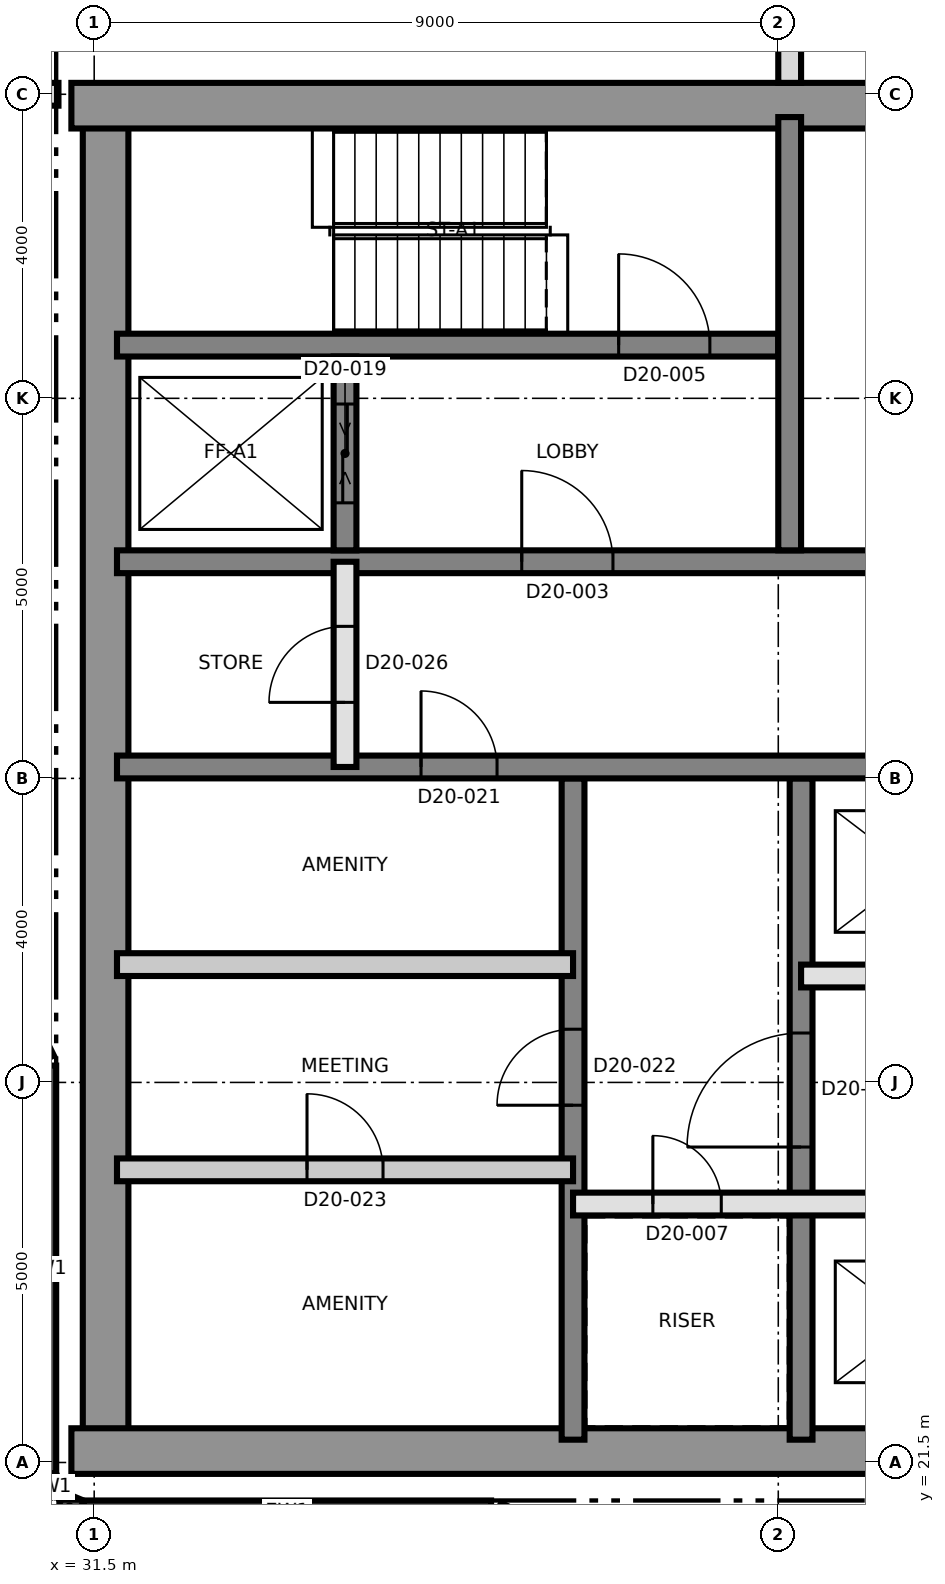
"""IFC4 building model, lengths in metres.
Left out: names, types, materials, properties, quantities, classifications, styles, units other than length and angle.
Written with IfcOpenShell. Run it as: python <this file> out.ifc"""

import sys

from ifc_helpers import new_model, si_unit, direction, frame, frame_2d, origin, place, context, subcontext, project, spatial, rectangle, extrude, element, fill, save


model = new_model("IFC4")
c1 = context("Model", 3, precision=1e-05, world=origin(), true_north=direction((0.0, 1.0)))
c2 = subcontext(c1, "Body", "Model", "MODEL_VIEW")
j1 = project(units=[si_unit("LENGTHUNIT", "METRE"), si_unit("PLANEANGLEUNIT", "RADIAN")], contexts=[c1])
p1 = place(None, origin())
s1 = spatial("IfcSite", under=j1, at=p1, CompositionType="ELEMENT")
p2 = place(p1, origin())
s2 = spatial("IfcBuilding", under=s1, at=p2, CompositionType="ELEMENT")
p3 = place(p2, frame((0.0, 0.0, 182.9)))
s3 = spatial("IfcBuildingStorey", under=s2, at=p3, CompositionType="ELEMENT", Elevation=182.9)
p4 = place(p3, frame((31.65, 21.8, 0.0), z_axis=(0.0, 0.0, 1.0), x_axis=(0.0, 1.0, 0.0)))
e1 = element("IfcWall", 1, at=p4, inside=s3, PredefinedType="SHEAR", context=c2, shape_type="SweptSolid", body=[
    extrude(rectangle(XDim=17.4, YDim=0.6, at=frame_2d((8.7, 0.0))), origin(), (0.0, 0.0, 1.0), 3.7),
])
p5 = place(p3, frame((31.2, 21.65, 0.0), z_axis=(0.0, 0.0, 1.0), x_axis=(1.0, 0.0, 0.0)))
e2 = element("IfcWall", 2, at=p5, inside=s3, PredefinedType="SHEAR", context=c2, shape_type="SweptSolid", body=[
    extrude(rectangle(XDim=27.0, YDim=0.6, at=frame_2d((13.5, 0.0))), origin(), (0.0, 0.0, 1.0), 3.7),
])
p6 = place(p3, frame((31.2, 39.35, 0.0), z_axis=(0.0, 0.0, 1.0), x_axis=(1.0, 0.0, 0.0)))
e3 = element("IfcWall", 3, at=p6, inside=s3, PredefinedType="SHEAR", context=c2, shape_type="SweptSolid", body=[
    extrude(rectangle(XDim=27.0, YDim=0.6, at=frame_2d((13.5, 0.0))), origin(), (0.0, 0.0, 1.0), 3.7),
])
p7 = place(p6, frame((10.5, 0.0, 0.0)))
e4 = element("IfcOpeningElement", 4, at=p7, cuts=e3, PredefinedType="OPENING", context=c2, shape_type="SweptSolid", body=[
    extrude(rectangle(XDim=1.2, YDim=2.1, at=frame_2d((0.6, 1.05))), frame((0.0, 0.31, 0.0), z_axis=(0.0, -1.0, 0.0), x_axis=(1.0, 0.0, 0.0)), (0.0, 0.0, 1.0), 0.62),
])
p8 = place(p3, frame((37.8, 21.8, 0.0), z_axis=(0.0, 0.0, 1.0), x_axis=(0.0, 1.0, 0.0)))
e5 = element("IfcWall", 5, at=p8, inside=s3, PredefinedType="SHEAR", context=c2, shape_type="SweptSolid", body=[
    extrude(rectangle(XDim=8.7, YDim=0.3, at=frame_2d((4.35, 0.0))), origin(), (0.0, 0.0, 1.0), 3.7),
])
p9 = place(p8, frame((4.4, 0.0, 0.0)))
e6 = element("IfcOpeningElement", 6, at=p9, cuts=e5, PredefinedType="OPENING", context=c2, shape_type="SweptSolid", body=[
    extrude(rectangle(XDim=1.0, YDim=2.1, at=frame_2d((0.5, 1.05))), frame((0.0, 0.16, 0.0), z_axis=(0.0, -1.0, 0.0), x_axis=(1.0, 0.0, 0.0)), (0.0, 0.0, 1.0), 0.32),
])
p10 = place(p3, frame((40.8, 21.8, 0.0), z_axis=(0.0, 0.0, 1.0), x_axis=(0.0, 1.0, 0.0)))
e7 = element("IfcWall", 7, at=p10, inside=s3, PredefinedType="SHEAR", context=c2, shape_type="SweptSolid", body=[
    extrude(rectangle(XDim=8.7, YDim=0.3, at=frame_2d((4.35, 0.0))), origin(), (0.0, 0.0, 1.0), 3.7),
])
p11 = place(p10, frame((3.85, 0.0, 0.0)))
e8 = element("IfcOpeningElement", 8, at=p11, cuts=e7, PredefinedType="OPENING", context=c2, shape_type="SweptSolid", body=[
    extrude(rectangle(XDim=1.5, YDim=2.1, at=frame_2d((0.75, 1.05))), frame((0.0, 0.16, 0.0), z_axis=(0.0, -1.0, 0.0), x_axis=(1.0, 0.0, 0.0)), (0.0, 0.0, 1.0), 0.32),
])
p12 = place(p3, frame((31.8, 30.65, 0.0), z_axis=(0.0, 0.0, 1.0), x_axis=(1.0, 0.0, 0.0)))
e9 = element("IfcWall", 9, at=p12, inside=s3, PredefinedType="SHEAR", context=c2, shape_type="SweptSolid", body=[
    extrude(rectangle(XDim=26.4, YDim=0.3, at=frame_2d((13.2, 0.0))), origin(), (0.0, 0.0, 1.0), 3.7),
])
p13 = place(p12, frame((24.7, 0.0, 0.0)))
e10 = element("IfcOpeningElement", 10, at=p13, cuts=e9, PredefinedType="OPENING", context=c2, shape_type="SweptSolid", body=[
    extrude(rectangle(XDim=1.0, YDim=2.1, at=frame_2d((0.5, 1.05))), frame((0.0, 0.16, 0.0), z_axis=(0.0, -1.0, 0.0), x_axis=(1.0, 0.0, 0.0)), (0.0, 0.0, 1.0), 0.32),
])
p14 = place(p12, frame((4.0, 0.0, 0.0)))
e11 = element("IfcOpeningElement", 11, at=p14, cuts=e9, PredefinedType="OPENING", context=c2, shape_type="SweptSolid", body=[
    extrude(rectangle(XDim=1.0, YDim=2.1, at=frame_2d((0.5, 1.05))), frame((0.0, 0.16, 0.0), z_axis=(0.0, -1.0, 0.0), x_axis=(1.0, 0.0, 0.0)), (0.0, 0.0, 1.0), 0.32),
])
p15 = place(p3, frame((31.8, 33.35, 0.0), z_axis=(0.0, 0.0, 1.0), x_axis=(1.0, 0.0, 0.0)))
e12 = element("IfcWall", 12, at=p15, inside=s3, PredefinedType="SHEAR", context=c2, shape_type="SweptSolid", body=[
    extrude(rectangle(XDim=26.4, YDim=0.3, at=frame_2d((13.2, 0.0))), origin(), (0.0, 0.0, 1.0), 3.7),
])
p16 = place(p15, frame((13.85, 0.0, 0.0)))
e13 = element("IfcOpeningElement", 13, at=p16, cuts=e12, PredefinedType="OPENING", context=c2, shape_type="SweptSolid", body=[
    extrude(rectangle(XDim=1.4, YDim=2.1, at=frame_2d((0.7, 1.05))), frame((0.0, 0.16, 0.0), z_axis=(0.0, -1.0, 0.0), x_axis=(1.0, 0.0, 0.0)), (0.0, 0.0, 1.0), 0.32),
])
p17 = place(p15, frame((5.325, 0.0, 0.0)))
e14 = element("IfcOpeningElement", 14, at=p17, cuts=e12, PredefinedType="OPENING", context=c2, shape_type="SweptSolid", body=[
    extrude(rectangle(XDim=1.2, YDim=2.1, at=frame_2d((0.6, 1.05))), frame((0.0, 0.16, 0.0), z_axis=(0.0, -1.0, 0.0), x_axis=(1.0, 0.0, 0.0)), (0.0, 0.0, 1.0), 0.32),
])
p18 = place(p15, frame((19.875, 0.0, 0.0)))
e15 = element("IfcOpeningElement", 15, at=p18, cuts=e12, PredefinedType="OPENING", context=c2, shape_type="SweptSolid", body=[
    extrude(rectangle(XDim=1.2, YDim=2.1, at=frame_2d((0.6, 1.05))), frame((0.0, 0.16, 0.0), z_axis=(0.0, -1.0, 0.0), x_axis=(1.0, 0.0, 0.0)), (0.0, 0.0, 1.0), 0.32),
])
p19 = place(p3, frame((31.8, 36.2, 0.0), z_axis=(0.0, 0.0, 1.0), x_axis=(1.0, 0.0, 0.0)))
e16 = element("IfcWall", 16, at=p19, inside=s3, PredefinedType="SHEAR", context=c2, shape_type="SweptSolid", body=[
    extrude(rectangle(XDim=8.7, YDim=0.3, at=frame_2d((4.35, 0.0))), origin(), (0.0, 0.0, 1.0), 3.7),
])
p20 = place(p19, frame((6.6, 0.0, 0.0)))
e17 = element("IfcOpeningElement", 17, at=p20, cuts=e16, PredefinedType="OPENING", context=c2, shape_type="SweptSolid", body=[
    extrude(rectangle(XDim=1.2, YDim=2.1, at=frame_2d((0.6, 1.05))), frame((0.0, 0.16, 0.0), z_axis=(0.0, -1.0, 0.0), x_axis=(1.0, 0.0, 0.0)), (0.0, 0.0, 1.0), 0.32),
])
p21 = place(p3, frame((40.65, 33.5, 0.0), z_axis=(0.0, 0.0, 1.0), x_axis=(0.0, 1.0, 0.0)))
e18 = element("IfcWall", 18, at=p21, inside=s3, PredefinedType="SHEAR", context=c2, shape_type="SweptSolid", body=[
    extrude(rectangle(XDim=5.7, YDim=0.3, at=frame_2d((2.85, 0.0))), origin(), (0.0, 0.0, 1.0), 3.7),
])
p22 = place(p3, frame((34.8, 33.5, 0.0), z_axis=(0.0, 0.0, 1.0), x_axis=(0.0, 1.0, 0.0)))
e19 = element("IfcWall", 19, at=p22, inside=s3, PredefinedType="SHEAR", context=c2, shape_type="SweptSolid", body=[
    extrude(rectangle(XDim=2.55, YDim=0.3, at=frame_2d((1.275, 0.0))), origin(), (0.0, 0.0, 1.0), 3.7),
])
p23 = place(p22, frame((0.625, 0.0, 0.0)))
e20 = element("IfcOpeningElement", 20, at=p23, cuts=e19, PredefinedType="OPENING", context=c2, shape_type="SweptSolid", body=[
    extrude(rectangle(XDim=1.3, YDim=2.4, at=frame_2d((0.65, 1.2))), frame((0.0, 0.16, 0.0), z_axis=(0.0, -1.0, 0.0), x_axis=(1.0, 0.0, 0.0)), (0.0, 0.0, 1.0), 0.32),
])
p24 = place(p3, frame((30.85, 26.722, 0.0), z_axis=(0.0, 0.0, 1.0), x_axis=(0.0, -1.0, 0.0)))
e21 = element("IfcWall", 21, at=p24, inside=s3, PredefinedType="SOLIDWALL", context=c2, shape_type="SweptSolid", body=[
    extrude(rectangle(XDim=5.362, YDim=0.3, at=frame_2d((2.681, 0.0))), origin(), (0.0, 0.0, 1.0), 3.4),
])
for number, where, z_axis, x_axis in (
    (22, (30.861, 21.302, 0.0), (0.0, 0.0, 1.0), (0.383, -0.924, 0.0)),
    (23, (31.048, 20.967, 0.0), (0.0, 0.0, 1.0), (0.924, -0.383, 0.0)),
):
    element("IfcWall", number, at=place(p3, frame(where, z_axis=z_axis, x_axis=x_axis)), inside=s3, PredefinedType="SOLIDWALL", context=c2, shape_type="SweptSolid", body=[
        extrude(rectangle(XDim=0.275, YDim=0.3, at=frame_2d((0.138, 0.0))), origin(), (0.0, 0.0, 1.0), 3.4),
    ])
p25 = place(p3, frame((31.36, 20.85, 0.0), z_axis=(0.0, 0.0, 1.0), x_axis=(1.0, 0.0, 0.0)))
e24 = element("IfcWall", 24, at=p25, inside=s3, PredefinedType="SOLIDWALL", context=c2, shape_type="SweptSolid", body=[
    extrude(rectangle(XDim=5.362, YDim=0.3, at=frame_2d((2.681, 0.0))), origin(), (0.0, 0.0, 1.0), 3.4),
])
for number, where, z_axis, x_axis in (
    (25, (36.788, 20.834, 0.0), (0.0, 0.0, 1.0), (0.897, -0.442, 0.0)),
    (26, (30.119, 28.24, 0.0), (0.0, 0.0, 1.0), (0.442, -0.897, 0.0)),
):
    element("IfcWall", number, at=place(p3, frame(where, z_axis=z_axis, x_axis=x_axis)), inside=s3, PredefinedType="SOLIDWALL", context=c2, shape_type="SweptSolid", body=[
        extrude(rectangle(XDim=1.618, YDim=0.3, at=frame_2d((0.809, 0.0))), origin(), (0.0, 0.0, 1.0), 3.4),
    ])
p26 = place(p3, frame((37.8, 24.9, 0.0), z_axis=(0.0, 0.0, 1.0), x_axis=(1.0, 0.0, 0.0)))
e27 = element("IfcWall", 27, at=p26, inside=s3, PredefinedType="SOLIDWALL", context=c2, shape_type="SweptSolid", body=[
    extrude(rectangle(XDim=12.0, YDim=0.3, at=frame_2d((6.0, 0.0))), origin(), (0.0, 0.0, 1.0), 3.4),
])
p27 = place(p26, frame((1.05, 0.0, 0.0)))
e28 = element("IfcOpeningElement", 28, at=p27, cuts=e27, PredefinedType="OPENING", context=c2, shape_type="SweptSolid", body=[
    extrude(rectangle(XDim=0.9, YDim=2.1, at=frame_2d((0.45, 1.05))), frame((0.0, 0.16, 0.0), z_axis=(0.0, -1.0, 0.0), x_axis=(1.0, 0.0, 0.0)), (0.0, 0.0, 1.0), 0.32),
])
p28 = place(p26, frame((10.05, 0.0, 0.0)))
e29 = element("IfcOpeningElement", 29, at=p28, cuts=e27, PredefinedType="OPENING", context=c2, shape_type="SweptSolid", body=[
    extrude(rectangle(XDim=0.9, YDim=2.1, at=frame_2d((0.45, 1.05))), frame((0.0, 0.16, 0.0), z_axis=(0.0, -1.0, 0.0), x_axis=(1.0, 0.0, 0.0)), (0.0, 0.0, 1.0), 0.32),
])
p29 = place(p26, frame((3.95, 0.0, 0.0)))
e30 = element("IfcOpeningElement", 30, at=p29, cuts=e27, PredefinedType="OPENING", context=c2, shape_type="SweptSolid", body=[
    extrude(rectangle(XDim=1.1, YDim=2.4, at=frame_2d((0.55, 1.2))), frame((0.0, 0.16, 0.0), z_axis=(0.0, -1.0, 0.0), x_axis=(1.0, 0.0, 0.0)), (0.0, 0.0, 1.0), 0.32),
])
p30 = place(p26, frame((6.95, 0.0, 0.0)))
e31 = element("IfcOpeningElement", 31, at=p30, cuts=e27, PredefinedType="OPENING", context=c2, shape_type="SweptSolid", body=[
    extrude(rectangle(XDim=1.1, YDim=2.4, at=frame_2d((0.55, 1.2))), frame((0.0, 0.16, 0.0), z_axis=(0.0, -1.0, 0.0), x_axis=(1.0, 0.0, 0.0)), (0.0, 0.0, 1.0), 0.32),
])
p31 = place(p3, frame((31.8, 25.35, 0.0), z_axis=(0.0, 0.0, 1.0), x_axis=(1.0, 0.0, 0.0)))
e32 = element("IfcWall", 32, at=p31, inside=s3, PredefinedType="PARTITIONING", context=c2, shape_type="SweptSolid", body=[
    extrude(rectangle(XDim=6.0, YDim=0.3, at=frame_2d((3.0, 0.0))), origin(), (0.0, 0.0, 1.0), 3.4),
])
p32 = place(p31, frame((2.5, 0.0, 0.0)))
e33 = element("IfcOpeningElement", 33, at=p32, cuts=e32, PredefinedType="OPENING", context=c2, shape_type="SweptSolid", body=[
    extrude(rectangle(XDim=1.0, YDim=2.1, at=frame_2d((0.5, 1.05))), frame((0.0, 0.16, 0.0), z_axis=(0.0, -1.0, 0.0), x_axis=(1.0, 0.0, 0.0)), (0.0, 0.0, 1.0), 0.32),
])
p33 = place(p3, frame((40.8, 27.9, 0.0), z_axis=(0.0, 0.0, 1.0), x_axis=(1.0, 0.0, 0.0)))
e34 = element("IfcWall", 34, at=p33, inside=s3, PredefinedType="SOLIDWALL", context=c2, shape_type="SweptSolid", body=[
    extrude(rectangle(XDim=6.0, YDim=0.3, at=frame_2d((3.0, 0.0))), origin(), (0.0, 0.0, 1.0), 3.4),
])
p34 = place(p33, frame((0.95, 0.0, 0.0)))
e35 = element("IfcOpeningElement", 35, at=p34, cuts=e34, PredefinedType="OPENING", context=c2, shape_type="SweptSolid", body=[
    extrude(rectangle(XDim=1.1, YDim=2.4, at=frame_2d((0.55, 1.2))), frame((0.0, 0.16, 0.0), z_axis=(0.0, -1.0, 0.0), x_axis=(1.0, 0.0, 0.0)), (0.0, 0.0, 1.0), 0.32),
])
p35 = place(p33, frame((3.95, 0.0, 0.0)))
e36 = element("IfcOpeningElement", 36, at=p35, cuts=e34, PredefinedType="OPENING", context=c2, shape_type="SweptSolid", body=[
    extrude(rectangle(XDim=1.1, YDim=2.4, at=frame_2d((0.55, 1.2))), frame((0.0, 0.16, 0.0), z_axis=(0.0, -1.0, 0.0), x_axis=(1.0, 0.0, 0.0)), (0.0, 0.0, 1.0), 0.32),
])
p36 = place(p3, frame((31.8, 28.05, 0.0), z_axis=(0.0, 0.0, 1.0), x_axis=(1.0, 0.0, 0.0)))
e37 = element("IfcWall", 37, at=p36, inside=s3, PredefinedType="PARTITIONING", context=c2, shape_type="SweptSolid", body=[
    extrude(rectangle(XDim=6.0, YDim=0.3, at=frame_2d((3.0, 0.0))), origin(), (0.0, 0.0, 1.0), 3.4),
])
p37 = place(p3, frame((34.8, 30.65, 0.0), z_axis=(0.0, 0.0, 1.0), x_axis=(0.0, 1.0, 0.0)))
e38 = element("IfcWall", 38, at=p37, inside=s3, PredefinedType="SOLIDWALL", context=c2, shape_type="SweptSolid", body=[
    extrude(rectangle(XDim=2.7, YDim=0.3, at=frame_2d((1.35, 0.0))), origin(), (0.0, 0.0, 1.0), 3.4),
])
p38 = place(p37, frame((0.85, 0.0, 0.0)))
e39 = element("IfcOpeningElement", 39, at=p38, cuts=e38, PredefinedType="OPENING", context=c2, shape_type="SweptSolid", body=[
    extrude(rectangle(XDim=1.0, YDim=2.1, at=frame_2d((0.5, 1.05))), frame((0.0, 0.16, 0.0), z_axis=(0.0, -1.0, 0.0), x_axis=(1.0, 0.0, 0.0)), (0.0, 0.0, 1.0), 0.32),
])
p39 = place(p3, frame((29.17, 39.5, 0.0), z_axis=(0.0, 0.0, 1.0), x_axis=(1.0, 0.0, 0.0)))
e40 = element("IfcWall", 40, at=p39, inside=s3, PredefinedType="PARTITIONING", context=c2, shape_type="SweptSolid", body=[
    extrude(rectangle(XDim=1.86, YDim=0.3, at=frame_2d((0.93, 0.0))), origin(), (0.0, 0.0, 1.0), 3.4),
])
p40 = place(p3, frame((40.65, 39.65, 0.0), z_axis=(0.0, 0.0, 1.0), x_axis=(0.0, 1.0, 0.0)))
e41 = element("IfcWall", 41, at=p40, inside=s3, PredefinedType="PARTITIONING", context=c2, shape_type="SweptSolid", body=[
    extrude(rectangle(XDim=37.35, YDim=0.3, at=frame_2d((18.675, 0.0))), origin(), (0.0, 0.0, 1.0), 3.4),
])
p41 = place(p40, frame((1.0, 0.0, 0.0)))
e42 = element("IfcOpeningElement", 42, at=p41, cuts=e41, PredefinedType="OPENING", context=c2, shape_type="SweptSolid", body=[
    extrude(rectangle(XDim=1.0, YDim=2.1, at=frame_2d((0.5, 1.05))), frame((0.0, 0.16, 0.0), z_axis=(0.0, -1.0, 0.0), x_axis=(1.0, 0.0, 0.0)), (0.0, 0.0, 1.0), 0.32),
])
p42 = place(p40, frame((6.85, 0.0, 0.0)))
e43 = element("IfcOpeningElement", 43, at=p42, cuts=e41, PredefinedType="OPENING", context=c2, shape_type="SweptSolid", body=[
    extrude(rectangle(XDim=1.0, YDim=2.1, at=frame_2d((0.5, 1.05))), frame((0.0, 0.16, 0.0), z_axis=(0.0, -1.0, 0.0), x_axis=(1.0, 0.0, 0.0)), (0.0, 0.0, 1.0), 0.32),
])
p43 = place(p40, frame((10.0, 0.0, 0.0)))
e44 = element("IfcOpeningElement", 44, at=p43, cuts=e41, PredefinedType="OPENING", context=c2, shape_type="SweptSolid", body=[
    extrude(rectangle(XDim=1.0, YDim=2.1, at=frame_2d((0.5, 1.05))), frame((0.0, 0.16, 0.0), z_axis=(0.0, -1.0, 0.0), x_axis=(1.0, 0.0, 0.0)), (0.0, 0.0, 1.0), 0.32),
])
p44 = place(p40, frame((15.85, 0.0, 0.0)))
e45 = element("IfcOpeningElement", 45, at=p44, cuts=e41, PredefinedType="OPENING", context=c2, shape_type="SweptSolid", body=[
    extrude(rectangle(XDim=1.0, YDim=2.1, at=frame_2d((0.5, 1.05))), frame((0.0, 0.16, 0.0), z_axis=(0.0, -1.0, 0.0), x_axis=(1.0, 0.0, 0.0)), (0.0, 0.0, 1.0), 0.32),
])
p45 = place(p40, frame((21.35, 0.0, 0.0)))
e46 = element("IfcOpeningElement", 46, at=p45, cuts=e41, PredefinedType="OPENING", context=c2, shape_type="SweptSolid", body=[
    extrude(rectangle(XDim=1.0, YDim=2.1, at=frame_2d((0.5, 1.05))), frame((0.0, 0.16, 0.0), z_axis=(0.0, -1.0, 0.0), x_axis=(1.0, 0.0, 0.0)), (0.0, 0.0, 1.0), 0.32),
])
p46 = place(p11, origin())
e47 = element("IfcDoor", 47, at=p46, inside=s3, OperationType="SINGLE_SWING_RIGHT", PredefinedType="DOOR", context=c2, shape_type="SweptSolid", body=[
    extrude(rectangle(XDim=1.5, YDim=2.1, at=frame_2d((0.75, 1.05))), frame((0.0, 0.025, 0.0), z_axis=(0.0, -1.0, 0.0), x_axis=(1.0, 0.0, 0.0)), (0.0, 0.0, 1.0), 0.05),
])
fill(e8, e47)
p47 = place(p17, origin())
e48 = element("IfcDoor", 48, at=p47, inside=s3, OperationType="SINGLE_SWING_LEFT", PredefinedType="DOOR", context=c2, shape_type="SweptSolid", body=[
    extrude(rectangle(XDim=1.2, YDim=2.1, at=frame_2d((0.6, 1.05))), frame((0.0, 0.025, 0.0), z_axis=(0.0, -1.0, 0.0), x_axis=(1.0, 0.0, 0.0)), (0.0, 0.0, 1.0), 0.05),
])
fill(e14, e48)
p48 = place(p20, origin())
e49 = element("IfcDoor", 49, at=p48, inside=s3, OperationType="SINGLE_SWING_RIGHT", PredefinedType="DOOR", context=c2, shape_type="SweptSolid", body=[
    extrude(rectangle(XDim=1.2, YDim=2.1, at=frame_2d((0.6, 1.05))), frame((0.0, 0.025, 0.0), z_axis=(0.0, -1.0, 0.0), x_axis=(1.0, 0.0, 0.0)), (0.0, 0.0, 1.0), 0.05),
])
fill(e17, e49)
p49 = place(p27, origin())
e50 = element("IfcDoor", 50, at=p49, inside=s3, OperationType="SINGLE_SWING_LEFT", PredefinedType="DOOR", context=c2, shape_type="SweptSolid", body=[
    extrude(rectangle(XDim=0.9, YDim=2.1, at=frame_2d((0.45, 1.05))), frame((0.0, 0.025, 0.0), z_axis=(0.0, -1.0, 0.0), x_axis=(1.0, 0.0, 0.0)), (0.0, 0.0, 1.0), 0.05),
])
fill(e28, e50)
p50 = place(p23, origin())
e51 = element("IfcDoor", 51, at=p50, inside=s3, OperationType="SLIDING_TO_LEFT", PredefinedType="DOOR", context=c2, shape_type="SweptSolid", body=[
    extrude(rectangle(XDim=1.3, YDim=2.4, at=frame_2d((0.65, 1.2))), frame((0.0, 0.025, 0.0), z_axis=(0.0, -1.0, 0.0), x_axis=(1.0, 0.0, 0.0)), (0.0, 0.0, 1.0), 0.05),
])
fill(e20, e51)
p51 = place(p14, origin())
e52 = element("IfcDoor", 52, at=p51, inside=s3, OperationType="SINGLE_SWING_LEFT", PredefinedType="DOOR", context=c2, shape_type="SweptSolid", body=[
    extrude(rectangle(XDim=1.0, YDim=2.1, at=frame_2d((0.5, 1.05))), frame((0.0, 0.025, 0.0), z_axis=(0.0, -1.0, 0.0), x_axis=(1.0, 0.0, 0.0)), (0.0, 0.0, 1.0), 0.05),
])
fill(e11, e52)
p52 = place(p9, origin())
e53 = element("IfcDoor", 53, at=p52, inside=s3, OperationType="SINGLE_SWING_RIGHT", PredefinedType="DOOR", context=c2, shape_type="SweptSolid", body=[
    extrude(rectangle(XDim=1.0, YDim=2.1, at=frame_2d((0.5, 1.05))), frame((0.0, 0.025, 0.0), z_axis=(0.0, -1.0, 0.0), x_axis=(1.0, 0.0, 0.0)), (0.0, 0.0, 1.0), 0.05),
])
fill(e6, e53)
p53 = place(p32, origin())
e54 = element("IfcDoor", 54, at=p53, inside=s3, OperationType="SINGLE_SWING_RIGHT", PredefinedType="DOOR", context=c2, shape_type="SweptSolid", body=[
    extrude(rectangle(XDim=1.0, YDim=2.1, at=frame_2d((0.5, 1.05))), frame((0.0, 0.025, 0.0), z_axis=(0.0, -1.0, 0.0), x_axis=(1.0, 0.0, 0.0)), (0.0, 0.0, 1.0), 0.05),
])
fill(e33, e54)
p54 = place(p38, origin())
e55 = element("IfcDoor", 55, at=p54, inside=s3, OperationType="SINGLE_SWING_RIGHT", PredefinedType="DOOR", context=c2, shape_type="SweptSolid", body=[
    extrude(rectangle(XDim=1.0, YDim=2.1, at=frame_2d((0.5, 1.05))), frame((0.0, 0.025, 0.0), z_axis=(0.0, -1.0, 0.0), x_axis=(1.0, 0.0, 0.0)), (0.0, 0.0, 1.0), 0.05),
])
fill(e39, e55)
save(model, sys.argv[1])
